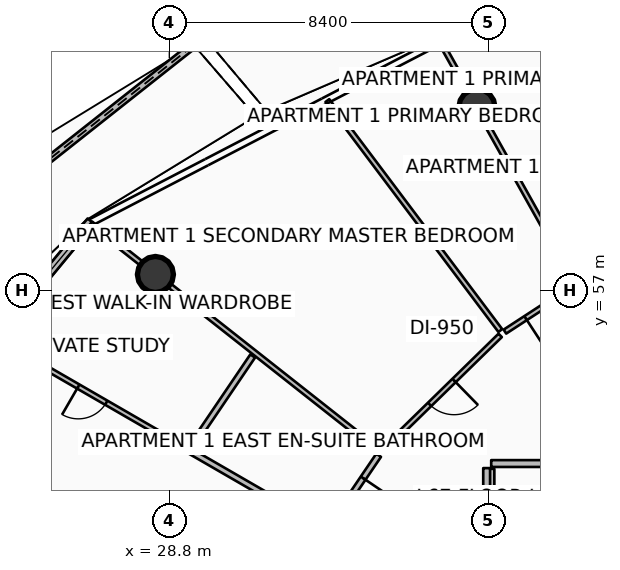
"""IFC4 building model, lengths in metres.
Left out: names, types, materials, properties, quantities, classifications, styles, units other than length and angle.
Written with IfcOpenShell. Run it as: python <this file> out.ifc"""

import sys

from ifc_helpers import new_model, si_unit, direction, frame, frame_2d, origin, origin_2d, place, context, subcontext, project, spatial, polyline, rectangle, circle, outline, extrude, element, fill, save


model = new_model("IFC4")
c1 = context("Model", 3, precision=1e-05, world=origin(), true_north=direction((0.0, 1.0)))
c2 = subcontext(c1, "Body", "Model", "MODEL_VIEW")
j1 = project(units=[si_unit("LENGTHUNIT", "METRE"), si_unit("PLANEANGLEUNIT", "RADIAN")], contexts=[c1])
p1 = place(None, origin())
s1 = spatial("IfcSite", under=j1, at=p1, CompositionType="ELEMENT")
p2 = place(p1, origin())
s2 = spatial("IfcBuilding", under=s1, at=p2, CompositionType="ELEMENT")
p3 = place(p2, frame((0.0, 0.0, 267.5)))
s3 = spatial("IfcBuildingStorey", under=s2, at=p3, CompositionType="ELEMENT", Elevation=267.5)
for number, where, z_axis, x_axis in (
    (1, (36.895, 61.83, 0.0), (0.0, 0.0, 1.0), (1.0, 0.0, 0.0)),
    (2, (28.434, 57.425, 0.0), (0.0, 0.0, 1.0), (1.0, 0.0, 0.0)),
):
    element("IfcColumn", number, at=place(p3, frame(where, z_axis=z_axis, x_axis=x_axis)), inside=s3, PredefinedType="COLUMN", context=c2, shape_type="SweptSolid", body=[
        extrude(circle(Radius=0.475, at=origin_2d()), origin(), (0.0, 0.0, 1.0), 3.59),
    ])
p4 = place(p3, frame((29.443, 63.461, 0.0), z_axis=(0.0, 0.0, 1.0), x_axis=(-0.784536716277, -0.620082366153, 0.0)))
e3 = element("IfcWall", 3, at=p4, inside=s3, PredefinedType="PARAPET", context=c2, shape_type="SweptSolid", body=[
    extrude(outline(polyline([(0.0, 0.0), (11.652, 0.0), (11.652, 1.832), (5.826, 1.853), (0.0, 1.756), (0.0, 0.0)])), frame((0.0, 0.09, 0.0), z_axis=(0.0, -1.0, 0.0), x_axis=(1.0, 0.0, 0.0)), (0.0, 0.0, 1.0), 0.18),
])
p5 = place(p3, frame((26.742, 58.822, 0.0), z_axis=(0.0, 0.0, 1.0), x_axis=(-0.636680093065, -0.771128043255, 0.0)))
e4 = element("IfcWall", 4, at=p5, inside=s3, PredefinedType="SOLIDWALL", context=c2, shape_type="SweptSolid", body=[
    extrude(rectangle(XDim=11.438, YDim=0.24, at=frame_2d((5.719, 0.0))), origin(), (0.0, 0.0, 1.0), 2.54),
])
p6 = place(p5, frame((9.218, 0.0, 0.0)))
e5 = element("IfcOpeningElement", 5, at=p6, cuts=e4, PredefinedType="OPENING", context=c2, shape_type="SweptSolid", body=[
    extrude(rectangle(XDim=1.45, YDim=2.15, at=frame_2d((0.725, 1.075))), frame((0.0, 0.13, 0.0), z_axis=(0.0, -1.0, 0.0), x_axis=(1.0, 0.0, 0.0)), (0.0, 0.0, 1.0), 0.26),
])
p7 = place(p5, frame((0.28, 0.0, 0.65)))
e6 = element("IfcOpeningElement", 6, at=p7, cuts=e4, PredefinedType="OPENING", context=c2, shape_type="SweptSolid", body=[
    extrude(rectangle(XDim=1.6, YDim=1.5, at=frame_2d((0.8, 0.75))), frame((0.0, 0.13, 0.0), z_axis=(0.0, -1.0, 0.0), x_axis=(1.0, 0.0, 0.0)), (0.0, 0.0, 1.0), 0.26),
])
p8 = place(p3, frame((37.29, 50.77, 0.0), z_axis=(0.0, 0.0, 1.0), x_axis=(0.0, 1.0, 0.0)))
e7 = element("IfcWall", 7, at=p8, inside=s3, PredefinedType="PARTITIONING", context=c2, shape_type="SweptSolid", body=[
    extrude(rectangle(XDim=1.54, YDim=0.125, at=frame_2d((0.77, 0.0))), origin(), (0.0, 0.0, 1.0), 3.03),
])
p9 = place(p3, frame((42.028, 52.45, 0.0), z_axis=(0.0, 0.0, 1.0), x_axis=(-1.0, 0.0, 0.0)))
e8 = element("IfcWall", 8, at=p9, inside=s3, PredefinedType="PARTITIONING", context=c2, shape_type="SweptSolid", body=[
    extrude(rectangle(XDim=4.758, YDim=0.18, at=frame_2d((2.379, 0.0))), origin(), (0.0, 0.0, 1.0), 2.957),
])
p10 = place(p3, frame((37.15, 52.33, 0.0), z_axis=(0.0, 0.0, 1.0), x_axis=(0.0, -1.0, 0.0)))
e9 = element("IfcWall", 9, at=p10, inside=s3, PredefinedType="PARTITIONING", context=c2, shape_type="SweptSolid", body=[
    extrude(rectangle(XDim=1.656, YDim=0.18, at=frame_2d((0.828, 0.0))), origin(), (0.0, 0.0, 1.0), 2.957),
])
p11 = place(p3, frame((39.467, 57.237, 0.0), z_axis=(0.0, 0.0, 1.0), x_axis=(-0.488642985948, 0.872483829239, 0.0)))
e10 = element("IfcWall", 10, at=p11, inside=s3, PredefinedType="PARTITIONING", context=c2, shape_type="SweptSolid", body=[
    extrude(rectangle(XDim=7.131, YDim=0.125, at=frame_2d((3.565, 0.0))), origin(), (0.0, 0.0, 1.0), 2.957),
])
p12 = place(p3, frame((37.509, 55.949, 0.0), z_axis=(0.0, 0.0, 1.0), x_axis=(-0.60104674722, 0.799213868534, 0.0)))
e11 = element("IfcWall", 11, at=p12, inside=s3, PredefinedType="PARTITIONING", context=c2, shape_type="SweptSolid", body=[
    extrude(rectangle(XDim=7.572, YDim=0.125, at=frame_2d((3.786, 0.0))), origin(), (0.0, 0.0, 1.0), 3.03),
])
p13 = place(p3, frame((39.432, 57.095, 0.0), z_axis=(0.0, 0.0, 1.0), x_axis=(-0.837734795217, -0.546077295703, 0.0)))
e12 = element("IfcWall", 12, at=p13, inside=s3, PredefinedType="PARTITIONING", context=c2, shape_type="SweptSolid", body=[
    extrude(rectangle(XDim=2.15, YDim=0.125, at=frame_2d((1.075, 0.0))), origin(), (0.0, 0.0, 1.0), 2.957),
])
p14 = place(p13, frame((0.65, 0.0, 0.0)))
e13 = element("IfcOpeningElement", 13, at=p14, cuts=e12, PredefinedType="OPENING", context=c2, shape_type="SweptSolid", body=[
    extrude(rectangle(XDim=0.85, YDim=2.06, at=frame_2d((0.425, 1.03))), frame((0.0, 0.073, 0.0), z_axis=(0.0, -1.0, 0.0), x_axis=(1.0, 0.0, 0.0)), (0.0, 0.0, 1.0), 0.145),
])
p15 = place(p3, frame((37.506, 55.822, 0.0), z_axis=(0.0, 0.0, 1.0), x_axis=(-0.715105814901, -0.699016218334, 0.0)))
e14 = element("IfcWall", 14, at=p15, inside=s3, PredefinedType="PARTITIONING", context=c2, shape_type="SweptSolid", body=[
    extrude(rectangle(XDim=4.294, YDim=0.125, at=frame_2d((2.147, 0.0))), origin(), (0.0, 0.0, 1.0), 2.957),
])
p16 = place(p15, frame((1.697, 0.0, 0.0)))
e15 = element("IfcOpeningElement", 15, at=p16, cuts=e14, PredefinedType="OPENING", context=c2, shape_type="SweptSolid", body=[
    extrude(rectangle(XDim=0.9, YDim=2.08, at=frame_2d((0.45, 1.04))), frame((0.0, 0.073, 0.0), z_axis=(0.0, -1.0, 0.0), x_axis=(1.0, 0.0, 0.0)), (0.0, 0.0, 1.0), 0.145),
])
p17 = place(p3, frame((34.285, 52.812, 0.0), z_axis=(0.0, 0.0, 1.0), x_axis=(-0.785324921183, 0.619083813526, 0.0)))
e16 = element("IfcWall", 16, at=p17, inside=s3, PredefinedType="PARTITIONING", context=c2, shape_type="SweptSolid", body=[
    extrude(rectangle(XDim=9.621, YDim=0.125, at=frame_2d((4.811, 0.0))), origin(), (0.0, 0.0, 1.0), 2.957),
])
p18 = place(p3, frame((34.308, 52.667, 0.0), z_axis=(0.0, 0.0, 1.0), x_axis=(-0.561141072409, -0.827720180288, 0.0)))
e17 = element("IfcWall", 17, at=p18, inside=s3, PredefinedType="PARTITIONING", context=c2, shape_type="SweptSolid", body=[
    extrude(rectangle(XDim=2.303, YDim=0.15, at=frame_2d((1.152, 0.0))), origin(), (0.0, 0.0, 1.0), 2.957),
])
p19 = place(p18, frame((0.727, 0.0, 0.0)))
e18 = element("IfcOpeningElement", 18, at=p19, cuts=e17, PredefinedType="OPENING", context=c2, shape_type="SweptSolid", body=[
    extrude(rectangle(XDim=0.85, YDim=2.06, at=frame_2d((0.425, 1.03))), frame((0.0, 0.085, 0.0), z_axis=(0.0, -1.0, 0.0), x_axis=(1.0, 0.0, 0.0)), (0.0, 0.0, 1.0), 0.17),
])
p20 = place(p3, frame((30.994, 55.28, 0.0), z_axis=(0.0, 0.0, 1.0), x_axis=(-0.561093021969, -0.827752753361, 0.0)))
e19 = element("IfcWall", 19, at=p20, inside=s3, PredefinedType="PARTITIONING", context=c2, shape_type="SweptSolid", body=[
    extrude(rectangle(XDim=2.91, YDim=0.15, at=frame_2d((1.455, 0.0))), origin(), (0.0, 0.0, 1.0), 2.957),
])
p21 = place(p3, frame((32.887, 50.731, 0.0), z_axis=(0.0, 0.0, 1.0), x_axis=(-0.865897249189, 0.500221904605, 0.0)))
e20 = element("IfcWall", 20, at=p21, inside=s3, PredefinedType="PARTITIONING", context=c2, shape_type="SweptSolid", body=[
    extrude(rectangle(XDim=4.09, YDim=0.15, at=frame_2d((2.045, 0.0))), origin(), (0.0, 0.0, 1.0), 3.03),
])
p22 = place(p3, frame((29.233, 52.842, 0.0), z_axis=(0.0, 0.0, 1.0), x_axis=(-0.865885749935, 0.500241809588, 0.0)))
e21 = element("IfcWall", 21, at=p22, inside=s3, PredefinedType="PARTITIONING", context=c2, shape_type="SweptSolid", body=[
    extrude(rectangle(XDim=5.683, YDim=0.125, at=frame_2d((2.841, 0.0))), origin(), (0.0, 0.0, 1.0), 3.03),
])
p23 = place(p22, frame((2.417, 0.0, 0.0)))
e22 = element("IfcOpeningElement", 22, at=p23, cuts=e21, PredefinedType="OPENING", context=c2, shape_type="SweptSolid", body=[
    extrude(rectangle(XDim=0.85, YDim=2.06, at=frame_2d((0.425, 1.03))), frame((0.0, 0.073, 0.0), z_axis=(0.0, -1.0, 0.0), x_axis=(1.0, 0.0, 0.0)), (0.0, 0.0, 1.0), 0.145),
])
p24 = place(p3, frame((31.92, 48.787, 0.0), z_axis=(0.0, 0.0, 1.0), x_axis=(-0.92130726737, 0.388835336731, 0.0)))
e23 = element("IfcWall", 23, at=p24, inside=s3, PredefinedType="PARTITIONING", context=c2, shape_type="SweptSolid", body=[
    extrude(rectangle(XDim=10.712, YDim=0.125, at=frame_2d((5.356, 0.0))), origin(), (0.0, 0.0, 1.0), 3.03),
])
p25 = place(p7, origin())
e24 = element("IfcWindow", 24, at=p25, inside=s3, PartitioningType="SINGLE_PANEL", PredefinedType="WINDOW", context=c2, shape_type="SweptSolid", body=[
    extrude(rectangle(XDim=1.6, YDim=1.5, at=frame_2d((0.8, 0.75))), frame((0.0, 0.03, 0.0), z_axis=(0.0, -1.0, 0.0), x_axis=(1.0, 0.0, 0.0)), (0.0, 0.0, 1.0), 0.06),
])
fill(e6, e24)
p26 = place(p14, origin())
e25 = element("IfcDoor", 25, at=p26, inside=s3, OperationType="SINGLE_SWING_RIGHT", PredefinedType="DOOR", context=c2, shape_type="SweptSolid", body=[
    extrude(rectangle(XDim=0.85, YDim=2.06, at=frame_2d((0.425, 1.03))), frame((0.0, 0.025, 0.0), z_axis=(0.0, -1.0, 0.0), x_axis=(1.0, 0.0, 0.0)), (0.0, 0.0, 1.0), 0.05),
])
fill(e13, e25)
p27 = place(p16, origin())
e26 = element("IfcDoor", 26, at=p27, inside=s3, OperationType="SINGLE_SWING_LEFT", PredefinedType="DOOR", context=c2, shape_type="SweptSolid", body=[
    extrude(rectangle(XDim=0.9, YDim=2.08, at=frame_2d((0.45, 1.04))), frame((0.0, 0.025, 0.0), z_axis=(0.0, -1.0, 0.0), x_axis=(1.0, 0.0, 0.0)), (0.0, 0.0, 1.0), 0.05),
])
fill(e15, e26)
p28 = place(p19, origin())
e27 = element("IfcDoor", 27, at=p28, inside=s3, OperationType="SINGLE_SWING_LEFT", PredefinedType="DOOR", context=c2, shape_type="SweptSolid", body=[
    extrude(rectangle(XDim=0.85, YDim=2.06, at=frame_2d((0.425, 1.03))), frame((0.0, 0.025, 0.0), z_axis=(0.0, -1.0, 0.0), x_axis=(1.0, 0.0, 0.0)), (0.0, 0.0, 1.0), 0.05),
])
fill(e18, e27)
p29 = place(p23, origin())
e28 = element("IfcDoor", 28, at=p29, inside=s3, OperationType="SINGLE_SWING_RIGHT", PredefinedType="DOOR", context=c2, shape_type="SweptSolid", body=[
    extrude(rectangle(XDim=0.85, YDim=2.06, at=frame_2d((0.425, 1.03))), frame((0.0, 0.025, 0.0), z_axis=(0.0, -1.0, 0.0), x_axis=(1.0, 0.0, 0.0)), (0.0, 0.0, 1.0), 0.05),
])
fill(e22, e28)
save(model, sys.argv[1])
